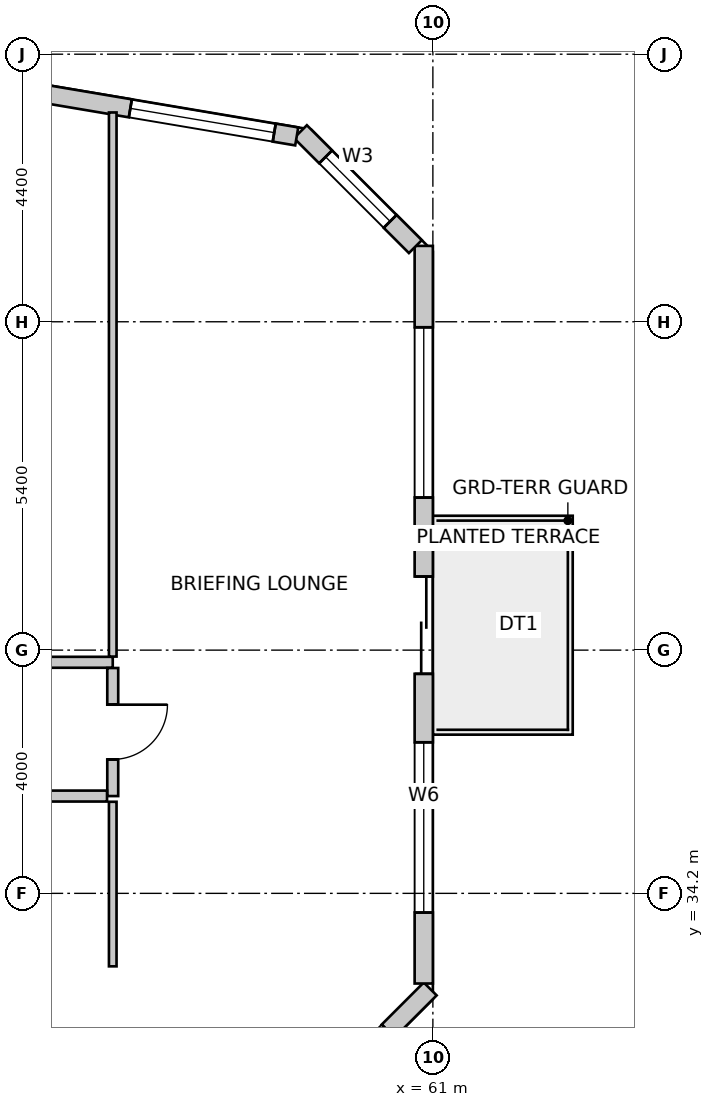
"""IFC4 building model, lengths in metres.
Left out: names, types, materials, properties, quantities, classifications, styles, units other than length and angle.
Written with IfcOpenShell. Run it as: python <this file> out.ifc"""

import sys

from ifc_helpers import new_model, si_unit, direction, frame, frame_2d, origin, place, context, subcontext, project, spatial, rectangle, extrude, source, transform, mapped, element, fill, save


model = new_model("IFC4")
c1 = context("Model", 3, precision=1e-05, world=origin(), true_north=direction((0.0, 1.0)))
c2 = subcontext(c1, "Body", "Model", "MODEL_VIEW")
j1 = project(units=[si_unit("LENGTHUNIT", "METRE"), si_unit("PLANEANGLEUNIT", "RADIAN")], contexts=[c1])
p1 = place(None, origin())
s1 = spatial("IfcSite", under=j1, at=p1, CompositionType="ELEMENT")
p2 = place(p1, origin())
s2 = spatial("IfcBuilding", under=s1, at=p2, CompositionType="ELEMENT")
p3 = place(p2, frame((0.0, 0.0, 27.0)))
s3 = spatial("IfcBuildingStorey", under=s2, at=p3, CompositionType="ELEMENT", Elevation=27.0)
p4 = place(p3, frame((57.876, 29.548, 0.0), z_axis=(0.0, 0.0, 1.0), x_axis=(0.707106781187, 0.707106781187, 0.0)))
e1 = element("IfcWall", 1, at=p4, inside=s3, PredefinedType="SOLIDWALL", context=c2, shape_type="SweptSolid", body=[
    extrude(rectangle(XDim=4.356, YDim=0.3, at=frame_2d((2.178, 0.0))), origin(), (0.0, 0.0, 1.0), 3.75),
])
m1 = source(origin(), c2, "Body", "SweptSolid", [
    extrude(rectangle(XDim=2.4, YDim=2.2, at=frame_2d((1.2, 1.1))), frame((0.0, 0.16, 0.0), z_axis=(0.0, -1.0, 0.0), x_axis=(1.0, 0.0, 0.0)), (0.0, 0.0, 1.0), 0.32),
])
p5 = place(p4, frame((0.978, 0.0, 0.85)))
e2 = element("IfcOpeningElement", 2, at=p5, cuts=e1, PredefinedType="OPENING", context=c2, shape_type="MappedRepresentation", body=[
    mapped(m1, transform((0.0, 0.0, 0.0), scale=1.0)),
])
p6 = place(p3, frame((60.85, 32.717, 0.0), z_axis=(0.0, 0.0, 1.0), x_axis=(0.0, 1.0, 0.0)))
e3 = element("IfcWall", 3, at=p6, inside=s3, PredefinedType="SOLIDWALL", context=c2, shape_type="SweptSolid", body=[
    extrude(rectangle(XDim=12.131, YDim=0.3, at=frame_2d((6.065, 0.0))), origin(), (0.0, 0.0, 1.0), 3.75),
])
m2 = source(origin(), c2, "Body", "SweptSolid", [
    extrude(rectangle(XDim=1.6, YDim=2.15, at=frame_2d((0.8, 1.075))), frame((0.0, 0.16, 0.0), z_axis=(0.0, -1.0, 0.0), x_axis=(1.0, 0.0, 0.0)), (0.0, 0.0, 1.0), 0.32),
])
p7 = place(p6, frame((5.093, 0.0, 0.0)))
e4 = element("IfcOpeningElement", 4, at=p7, cuts=e3, PredefinedType="OPENING", context=c2, shape_type="MappedRepresentation", body=[
    mapped(m2, transform((0.0, 0.0, 0.0), scale=1.0)),
])
m3 = source(origin(), c2, "Body", "SweptSolid", [
    extrude(rectangle(XDim=2.8, YDim=2.4, at=frame_2d((1.4, 1.2))), frame((0.0, 0.16, 0.0), z_axis=(0.0, -1.0, 0.0), x_axis=(1.0, 0.0, 0.0)), (0.0, 0.0, 1.0), 0.32),
])
p8 = place(p6, frame((1.167, 0.0, 0.85)))
e5 = element("IfcOpeningElement", 5, at=p8, cuts=e3, PredefinedType="OPENING", context=c2, shape_type="MappedRepresentation", body=[
    mapped(m3, transform((0.0, 0.0, 0.0), scale=1.0)),
])
p9 = place(p6, frame((7.992, 0.0, 0.85)))
e6 = element("IfcOpeningElement", 6, at=p9, cuts=e3, PredefinedType="OPENING", context=c2, shape_type="MappedRepresentation", body=[
    mapped(m3, transform((0.0, 0.0, 0.0), scale=1.0)),
])
p10 = place(p3, frame((60.712, 44.836, 0.0), z_axis=(0.0, 0.0, 1.0), x_axis=(-0.707106781187, 0.707106781187, 0.0)))
e7 = element("IfcWall", 7, at=p10, inside=s3, PredefinedType="SOLIDWALL", context=c2, shape_type="SweptSolid", body=[
    extrude(rectangle(XDim=2.673, YDim=0.3, at=frame_2d((1.336, 0.0))), origin(), (0.0, 0.0, 1.0), 3.75),
])
m4 = source(origin(), c2, "Body", "SweptSolid", [
    extrude(rectangle(XDim=1.5, YDim=1.8, at=frame_2d((0.75, 0.9))), frame((0.0, 0.16, 0.0), z_axis=(0.0, -1.0, 0.0), x_axis=(1.0, 0.0, 0.0)), (0.0, 0.0, 1.0), 0.32),
])
p11 = place(p10, frame((0.587, 0.0, 0.85)))
e8 = element("IfcOpeningElement", 8, at=p11, cuts=e7, PredefinedType="OPENING", context=c2, shape_type="MappedRepresentation", body=[
    mapped(m4, transform((0.0, 0.0, 0.0), scale=1.0)),
])
p12 = place(p3, frame((58.761, 46.648, 0.0), z_axis=(0.0, 0.0, 1.0), x_axis=(-0.98607502735, 0.166301053624, 0.0)))
e9 = element("IfcWall", 9, at=p12, inside=s3, PredefinedType="SOLIDWALL", context=c2, shape_type="SweptSolid", body=[
    extrude(rectangle(XDim=37.397, YDim=0.3, at=frame_2d((18.699, 0.0))), origin(), (0.0, 0.0, 1.0), 3.75),
])
p13 = place(p12, frame((0.375, 0.0, 0.85)))
e10 = element("IfcOpeningElement", 10, at=p13, cuts=e9, PredefinedType="OPENING", context=c2, shape_type="MappedRepresentation", body=[
    mapped(m1, transform((0.0, 0.0, 0.0), scale=1.0)),
])
p14 = place(p12, frame((4.54, 0.0, 0.85)))
e11 = element("IfcOpeningElement", 11, at=p14, cuts=e9, PredefinedType="OPENING", context=c2, shape_type="MappedRepresentation", body=[
    mapped(m3, transform((0.0, 0.0, 0.0), scale=1.0)),
])
p15 = place(p12, frame((10.081, 0.0, 0.85)))
e12 = element("IfcOpeningElement", 12, at=p15, cuts=e9, PredefinedType="OPENING", context=c2, shape_type="MappedRepresentation", body=[
    mapped(m1, transform((0.0, 0.0, 0.0), scale=1.0)),
])
p16 = place(p12, frame((15.273, 0.0, 0.85)))
e13 = element("IfcOpeningElement", 13, at=p16, cuts=e9, PredefinedType="OPENING", context=c2, shape_type="MappedRepresentation", body=[
    mapped(m3, transform((0.0, 0.0, 0.0), scale=1.0)),
])
p17 = place(p12, frame((20.036, 0.0, 0.85)))
e14 = element("IfcOpeningElement", 14, at=p17, cuts=e9, PredefinedType="OPENING", context=c2, shape_type="MappedRepresentation", body=[
    mapped(m1, transform((0.0, 0.0, 0.0), scale=1.0)),
])
p18 = place(p12, frame((24.398, 0.0, 0.85)))
e15 = element("IfcOpeningElement", 15, at=p18, cuts=e9, PredefinedType="OPENING", context=c2, shape_type="MappedRepresentation", body=[
    mapped(m3, transform((0.0, 0.0, 0.0), scale=1.0)),
])
p19 = place(p12, frame((29.757, 0.0, 0.85)))
e16 = element("IfcOpeningElement", 16, at=p19, cuts=e9, PredefinedType="OPENING", context=c2, shape_type="MappedRepresentation", body=[
    mapped(m3, transform((0.0, 0.0, 0.0), scale=1.0)),
])
p20 = place(p12, frame((34.256, 0.0, 0.85)))
e17 = element("IfcOpeningElement", 17, at=p20, cuts=e9, PredefinedType="OPENING", context=c2, shape_type="MappedRepresentation", body=[
    mapped(m3, transform((0.0, 0.0, 0.0), scale=1.0)),
])
p21 = place(p3, frame((44.929, 38.0, 0.0), z_axis=(0.0, 0.0, 1.0), x_axis=(1.0, 0.0, 0.0)))
e18 = element("IfcWall", 18, at=p21, inside=s3, PredefinedType="PARTITIONING", context=c2, shape_type="SweptSolid", body=[
    extrude(rectangle(XDim=10.806, YDim=0.18, at=frame_2d((5.403, 0.0))), origin(), (0.0, 0.0, 1.0), 3.125),
])
m5 = source(origin(), c2, "Body", "SweptSolid", [
    extrude(rectangle(XDim=0.9, YDim=2.15, at=frame_2d((0.45, 1.075))), frame((0.0, 0.1, 0.0), z_axis=(0.0, -1.0, 0.0), x_axis=(1.0, 0.0, 0.0)), (0.0, 0.0, 1.0), 0.2),
])
p22 = place(p21, frame((4.892, 0.0, 0.0)))
e19 = element("IfcOpeningElement", 19, at=p22, cuts=e18, PredefinedType="OPENING", context=c2, shape_type="MappedRepresentation", body=[
    mapped(m5, transform((0.0, 0.0, 0.0), scale=1.0)),
])
p23 = place(p3, frame((55.735, 37.906, 0.0), z_axis=(0.0, 0.0, 1.0), x_axis=(0.0, -1.0, 0.0)))
e20 = element("IfcWall", 20, at=p23, inside=s3, PredefinedType="PARTITIONING", context=c2, shape_type="SweptSolid", body=[
    extrude(rectangle(XDim=2.106, YDim=0.18, at=frame_2d((1.053, 0.0))), origin(), (0.0, 0.0, 1.0), 3.75),
])
p24 = place(p23, frame((0.603, 0.0, 0.0)))
e21 = element("IfcOpeningElement", 21, at=p24, cuts=e20, PredefinedType="OPENING", context=c2, shape_type="MappedRepresentation", body=[
    mapped(m5, transform((0.0, 0.0, 0.0), scale=1.0)),
])
p25 = place(p3, frame((55.641, 35.8, 0.0), z_axis=(0.0, 0.0, 1.0), x_axis=(-1.0, 0.0, 0.0)))
e22 = element("IfcWall", 22, at=p25, inside=s3, PredefinedType="PARTITIONING", context=c2, shape_type="SweptSolid", body=[
    extrude(rectangle(XDim=21.841, YDim=0.18, at=frame_2d((10.92, 0.0))), origin(), (0.0, 0.0, 1.0), 3.125),
])
p26 = place(p25, frame((10.531, 0.0, 0.0)))
e23 = element("IfcOpeningElement", 23, at=p26, cuts=e22, PredefinedType="OPENING", context=c2, shape_type="MappedRepresentation", body=[
    mapped(m5, transform((0.0, 0.0, 0.0), scale=1.0)),
])
p27 = place(p3, frame((55.735, 47.042, 0.0), z_axis=(0.0, 0.0, 1.0), x_axis=(0.0, -1.0, 0.0)))
e24 = element("IfcWall", 24, at=p27, inside=s3, PredefinedType="PARTITIONING", context=c2, shape_type="SweptSolid", body=[
    extrude(rectangle(XDim=8.948, YDim=0.125, at=frame_2d((4.474, 0.0))), origin(), (0.0, 0.0, 1.0), 3.75),
])
p28 = place(p3, frame((55.735, 33.0, 0.0), z_axis=(0.0, 0.0, 1.0), x_axis=(0.0, 1.0, 0.0)))
e25 = element("IfcWall", 25, at=p28, inside=s3, PredefinedType="PARTITIONING", context=c2, shape_type="SweptSolid", body=[
    extrude(rectangle(XDim=2.706, YDim=0.125, at=frame_2d((1.353, 0.0))), origin(), (0.0, 0.0, 1.0), 3.75),
])
m6 = source(origin(), c2, "Body", "SweptSolid", [
    extrude(rectangle(XDim=1.6, YDim=2.15, at=frame_2d((0.8, 1.075))), frame((0.0, 0.025, 0.0), z_axis=(0.0, -1.0, 0.0), x_axis=(1.0, 0.0, 0.0)), (0.0, 0.0, 1.0), 0.05),
])
p29 = place(p7, origin())
e26 = element("IfcDoor", 26, at=p29, inside=s3, OperationType="DOUBLE_DOOR_SLIDING", PredefinedType="DOOR", context=c2, shape_type="MappedRepresentation", body=[
    mapped(m6, transform((0.0, 0.0, 0.0), scale=1.0)),
])
fill(e4, e26)
m7 = source(origin(), c2, "Body", "SweptSolid", [
    extrude(rectangle(XDim=2.8, YDim=2.4, at=frame_2d((1.4, 1.2))), frame((0.0, -0.015, 0.0), z_axis=(0.0, -1.0, 0.0), x_axis=(1.0, 0.0, 0.0)), (0.0, 0.0, 1.0), 0.06),
])
p30 = place(p8, origin())
e27 = element("IfcWindow", 27, at=p30, inside=s3, PartitioningType="SINGLE_PANEL", PredefinedType="WINDOW", context=c2, shape_type="MappedRepresentation", body=[
    mapped(m7, transform((0.0, 0.0, 0.0), scale=1.0)),
])
fill(e5, e27)
p31 = place(p9, origin())
e28 = element("IfcWindow", 28, at=p31, inside=s3, PartitioningType="SINGLE_PANEL", PredefinedType="WINDOW", context=c2, shape_type="MappedRepresentation", body=[
    mapped(m7, transform((0.0, 0.0, 0.0), scale=1.0)),
])
fill(e6, e28)
m8 = source(origin(), c2, "Body", "SweptSolid", [
    extrude(rectangle(XDim=1.5, YDim=1.8, at=frame_2d((0.75, 0.9))), frame((0.0, -0.015, 0.0), z_axis=(0.0, -1.0, 0.0), x_axis=(1.0, 0.0, 0.0)), (0.0, 0.0, 1.0), 0.06),
])
p32 = place(p11, origin())
e29 = element("IfcWindow", 29, at=p32, inside=s3, PartitioningType="SINGLE_PANEL", PredefinedType="WINDOW", context=c2, shape_type="MappedRepresentation", body=[
    mapped(m8, transform((0.0, 0.0, 0.0), scale=1.0)),
])
fill(e8, e29)
m9 = source(origin(), c2, "Body", "SweptSolid", [
    extrude(rectangle(XDim=2.4, YDim=2.2, at=frame_2d((1.2, 1.1))), frame((0.0, -0.015, 0.0), z_axis=(0.0, -1.0, 0.0), x_axis=(1.0, 0.0, 0.0)), (0.0, 0.0, 1.0), 0.06),
])
p33 = place(p13, origin())
e30 = element("IfcWindow", 30, at=p33, inside=s3, PartitioningType="SINGLE_PANEL", PredefinedType="WINDOW", context=c2, shape_type="MappedRepresentation", body=[
    mapped(m9, transform((0.0, 0.0, 0.0), scale=1.0)),
])
fill(e10, e30)
m10 = source(origin(), c2, "Body", "SweptSolid", [
    extrude(rectangle(XDim=0.9, YDim=2.15, at=frame_2d((0.45, 1.075))), frame((0.0, 0.025, 0.0), z_axis=(0.0, -1.0, 0.0), x_axis=(1.0, 0.0, 0.0)), (0.0, 0.0, 1.0), 0.05),
])
p34 = place(p24, origin())
e31 = element("IfcDoor", 31, at=p34, inside=s3, OperationType="SINGLE_SWING_LEFT", PredefinedType="DOOR", context=c2, shape_type="MappedRepresentation", body=[
    mapped(m10, transform((0.0, 0.0, 0.0), scale=1.0)),
])
fill(e21, e31)
save(model, sys.argv[1])
